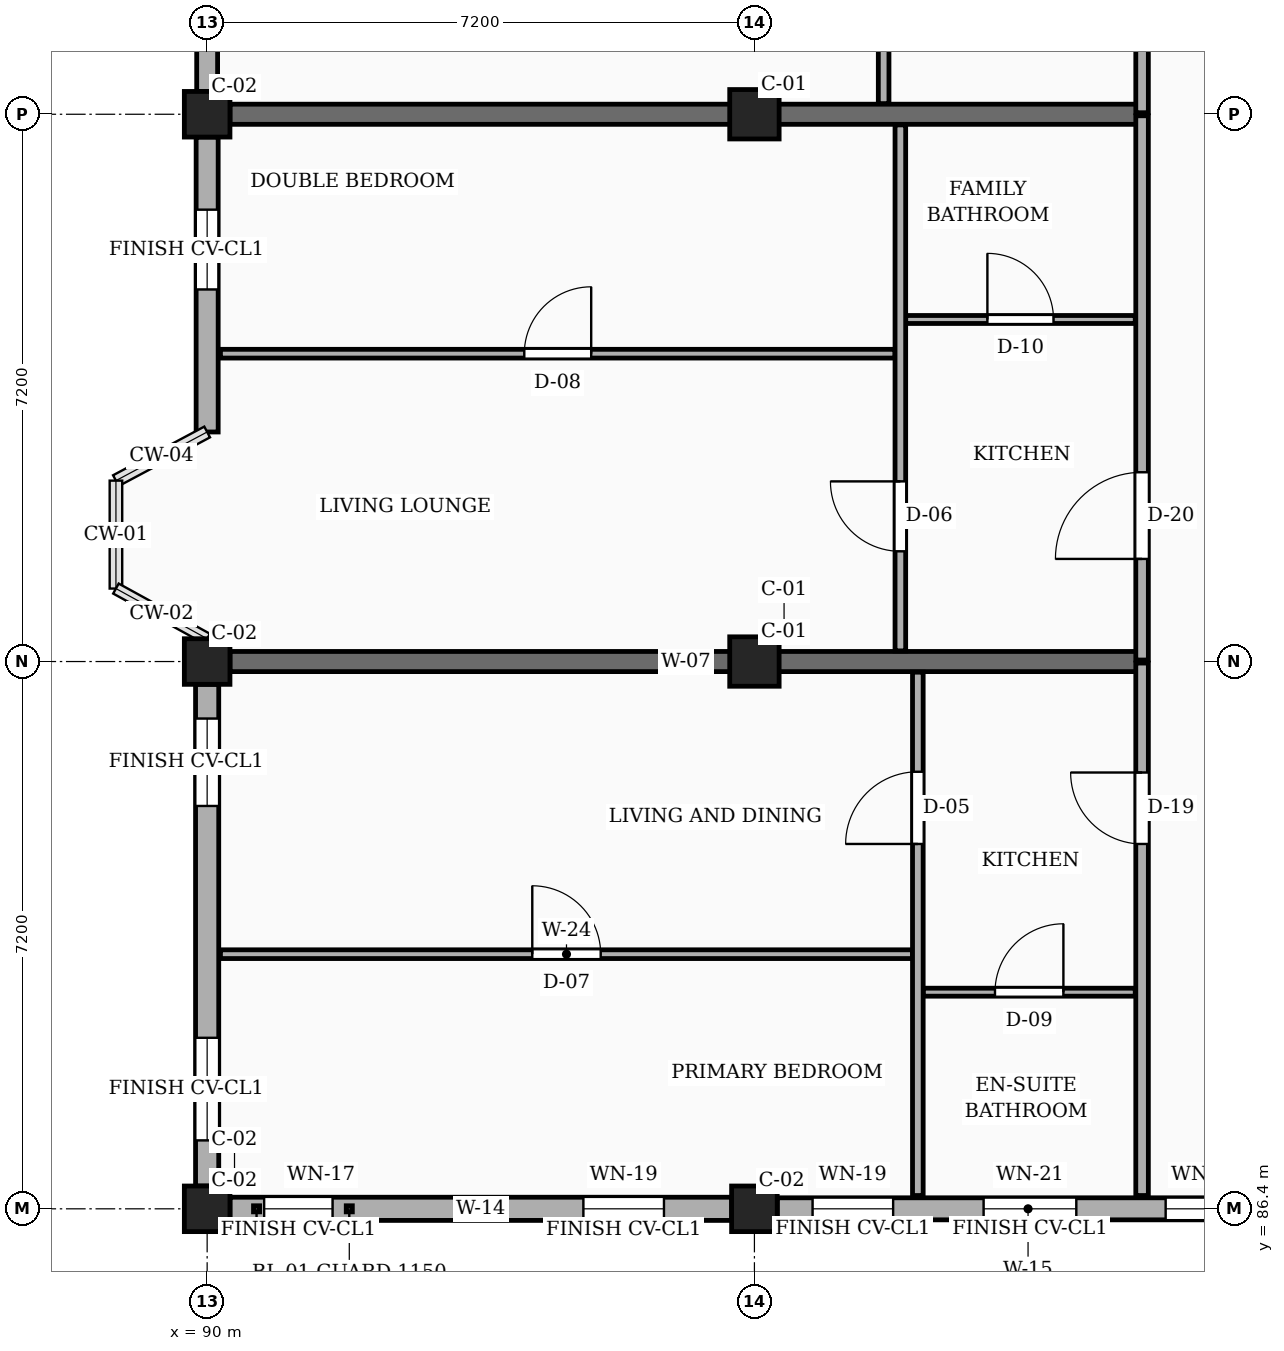
"""IFC4 building model, lengths in metres.
Left out: names, types, materials, properties, quantities, classifications, styles, units other than length and angle.
Written with IfcOpenShell. Run it as: python <this file> out.ifc"""

import sys

from ifc_helpers import new_model, si_unit, direction, frame, frame_2d, origin, origin_2d, place, context, subcontext, project, spatial, rectangle, extrude, element, fill, save


model = new_model("IFC4")
c1 = context("Model", 3, precision=1e-05, world=origin(), true_north=direction((0.0, 1.0)))
c2 = subcontext(c1, "Body", "Model", "MODEL_VIEW")
j1 = project(units=[si_unit("LENGTHUNIT", "METRE"), si_unit("PLANEANGLEUNIT", "RADIAN")], contexts=[c1])
p1 = place(None, origin())
s1 = spatial("IfcSite", under=j1, at=p1, CompositionType="ELEMENT")
p2 = place(p1, origin())
s2 = spatial("IfcBuilding", under=s1, at=p2, CompositionType="ELEMENT")
p3 = place(p2, frame((0.0, 0.0, 7.65)))
s3 = spatial("IfcBuildingStorey", under=s2, at=p3, CompositionType="ELEMENT", Elevation=7.65)
for number, where, z_axis, x_axis in (
    (1, (90.0, 86.4, 0.0), (0.0, 0.0, 1.0), (1.0, 0.0, 0.0)),
    (2, (90.0, 93.6, 0.0), (0.0, 0.0, 1.0), (1.0, 0.0, 0.0)),
    (3, (90.0, 100.8, 0.0), (0.0, 0.0, 1.0), (1.0, 0.0, 0.0)),
    (4, (97.2, 86.4, 0.0), (0.0, 0.0, 1.0), (1.0, 0.0, 0.0)),
):
    element("IfcColumn", number, at=place(p3, frame(where, z_axis=z_axis, x_axis=x_axis)), inside=s3, PredefinedType="COLUMN", context=c2, shape_type="SweptSolid", body=[
        extrude(rectangle(XDim=0.6, YDim=0.6, at=origin_2d()), origin(), (0.0, 0.0, 1.0), 3.15),
    ])
for number, where, z_axis, x_axis in (
    (5, (97.2, 93.6, 0.0), (0.0, 0.0, 1.0), (1.0, 0.0, 0.0)),
    (6, (97.2, 100.8, 0.0), (0.0, 0.0, 1.0), (1.0, 0.0, 0.0)),
):
    element("IfcColumn", number, at=place(p3, frame(where, z_axis=z_axis, x_axis=x_axis)), inside=s3, PredefinedType="COLUMN", context=c2, shape_type="SweptSolid", body=[
        extrude(rectangle(XDim=0.65, YDim=0.65, at=origin_2d()), origin(), (0.0, 0.0, 1.0), 3.15),
    ])
for number, where, z_axis, x_axis in (
    (7, (90.3, 93.6, 0.0), (0.0, 0.0, 1.0), (1.0, 0.0, 0.0)),
    (8, (90.3, 100.8, 0.0), (0.0, 0.0, 1.0), (1.0, 0.0, 0.0)),
):
    element("IfcWall", number, at=place(p3, frame(where, z_axis=z_axis, x_axis=x_axis)), inside=s3, PredefinedType="SOLIDWALL", context=c2, shape_type="SweptSolid", body=[
        extrude(rectangle(XDim=12.0, YDim=0.265, at=frame_2d((6.0, 0.0))), origin(), (0.0, 0.0, 1.0), 2.19),
    ])
p4 = place(p3, frame((90.3, 86.4, 0.0), z_axis=(0.0, 0.0, 1.0), x_axis=(1.0, 0.0, 0.0)))
e9 = element("IfcWall", 9, at=p4, inside=s3, PredefinedType="SOLIDWALL", context=c2, shape_type="SweptSolid", body=[
    extrude(rectangle(XDim=6.6, YDim=0.305, at=frame_2d((3.3, 0.0))), origin(), (0.0, 0.0, 1.0), 2.46),
])
p5 = place(p4, frame((0.45, 0.0, 0.78)))
e10 = element("IfcOpeningElement", 10, at=p5, cuts=e9, PredefinedType="OPENING", context=c2, shape_type="SweptSolid", body=[
    extrude(rectangle(XDim=0.9, YDim=1.36, at=frame_2d((0.45, 0.68))), frame((0.0, 0.163, 0.0), z_axis=(0.0, -1.0, 0.0), x_axis=(1.0, 0.0, 0.0)), (0.0, 0.0, 1.0), 0.325),
])
p6 = place(p4, frame((4.65, 0.0, 0.78)))
e11 = element("IfcOpeningElement", 11, at=p6, cuts=e9, PredefinedType="OPENING", context=c2, shape_type="SweptSolid", body=[
    extrude(rectangle(XDim=1.06, YDim=1.36, at=frame_2d((0.53, 0.68))), frame((0.0, 0.163, 0.0), z_axis=(0.0, -1.0, 0.0), x_axis=(1.0, 0.0, 0.0)), (0.0, 0.0, 1.0), 0.325),
])
p7 = place(p3, frame((97.5, 86.4, 0.0), z_axis=(0.0, 0.0, 1.0), x_axis=(1.0, 0.0, 0.0)))
e12 = element("IfcWall", 12, at=p7, inside=s3, PredefinedType="SOLIDWALL", context=c2, shape_type="SweptSolid", body=[
    extrude(rectangle(XDim=6.6, YDim=0.29, at=frame_2d((3.3, 0.0))), origin(), (0.0, 0.0, 1.0), 2.46),
])
p8 = place(p7, frame((0.465, 0.0, 0.78)))
e13 = element("IfcOpeningElement", 13, at=p8, cuts=e12, PredefinedType="OPENING", context=c2, shape_type="SweptSolid", body=[
    extrude(rectangle(XDim=1.06, YDim=1.36, at=frame_2d((0.53, 0.68))), frame((0.0, 0.155, 0.0), z_axis=(0.0, -1.0, 0.0), x_axis=(1.0, 0.0, 0.0)), (0.0, 0.0, 1.0), 0.31),
])
p9 = place(p7, frame((2.715, 0.0, 0.78)))
e14 = element("IfcOpeningElement", 14, at=p9, cuts=e12, PredefinedType="OPENING", context=c2, shape_type="SweptSolid", body=[
    extrude(rectangle(XDim=1.22, YDim=1.36, at=frame_2d((0.61, 0.68))), frame((0.0, 0.155, 0.0), z_axis=(0.0, -1.0, 0.0), x_axis=(1.0, 0.0, 0.0)), (0.0, 0.0, 1.0), 0.31),
])
p10 = place(p7, frame((5.11, 0.0, 0.78)))
e15 = element("IfcOpeningElement", 15, at=p10, cuts=e12, PredefinedType="OPENING", context=c2, shape_type="SweptSolid", body=[
    extrude(rectangle(XDim=1.04, YDim=1.26, at=frame_2d((0.52, 0.63))), frame((0.0, 0.155, 0.0), z_axis=(0.0, -1.0, 0.0), x_axis=(1.0, 0.0, 0.0)), (0.0, 0.0, 1.0), 0.31),
])
p11 = place(p3, frame((90.0, 107.7, 0.0), z_axis=(0.0, 0.0, 1.0), x_axis=(0.0, -1.0, 0.0)))
e16 = element("IfcWall", 16, at=p11, inside=s3, PredefinedType="SOLIDWALL", context=c2, shape_type="SweptSolid", body=[
    extrude(rectangle(XDim=6.6, YDim=0.275, at=frame_2d((3.3, 0.0))), origin(), (0.0, 0.0, 1.0), 2.46),
])
p12 = place(p11, frame((0.45, 0.0, 0.78)))
e17 = element("IfcOpeningElement", 17, at=p12, cuts=e16, PredefinedType="OPENING", context=c2, shape_type="SweptSolid", body=[
    extrude(rectangle(XDim=1.46, YDim=1.36, at=frame_2d((0.73, 0.68))), frame((0.0, 0.147, 0.0), z_axis=(0.0, -1.0, 0.0), x_axis=(1.0, 0.0, 0.0)), (0.0, 0.0, 1.0), 0.295),
])
p13 = place(p11, frame((4.65, 0.0, 0.78)))
e18 = element("IfcOpeningElement", 18, at=p13, cuts=e16, PredefinedType="OPENING", context=c2, shape_type="SweptSolid", body=[
    extrude(rectangle(XDim=1.05, YDim=1.44, at=frame_2d((0.525, 0.72))), frame((0.0, 0.147, 0.0), z_axis=(0.0, -1.0, 0.0), x_axis=(1.0, 0.0, 0.0)), (0.0, 0.0, 1.0), 0.295),
])
p14 = place(p3, frame((90.0, 100.5, 0.0), z_axis=(0.0, 0.0, 1.0), x_axis=(0.0, -1.0, 0.0)))
e19 = element("IfcWall", 19, at=p14, inside=s3, PredefinedType="SOLIDWALL", context=c2, shape_type="SweptSolid", body=[
    extrude(rectangle(XDim=3.88, YDim=0.29, at=frame_2d((1.94, 0.0))), origin(), (0.0, 0.0, 1.0), 2.46),
])
p15 = place(p14, frame((0.955, 0.0, 0.78)))
e20 = element("IfcOpeningElement", 20, at=p15, cuts=e19, PredefinedType="OPENING", context=c2, shape_type="SweptSolid", body=[
    extrude(rectangle(XDim=1.05, YDim=1.44, at=frame_2d((0.525, 0.72))), frame((0.0, 0.155, 0.0), z_axis=(0.0, -1.0, 0.0), x_axis=(1.0, 0.0, 0.0)), (0.0, 0.0, 1.0), 0.31),
])
p16 = place(p3, frame((90.0, 93.3, 0.0), z_axis=(0.0, 0.0, 1.0), x_axis=(0.0, -1.0, 0.0)))
e21 = element("IfcWall", 21, at=p16, inside=s3, PredefinedType="SOLIDWALL", context=c2, shape_type="SweptSolid", body=[
    extrude(rectangle(XDim=6.6, YDim=0.305, at=frame_2d((3.3, 0.0))), origin(), (0.0, 0.0, 1.0), 2.46),
])
p17 = place(p16, frame((0.45, 0.0, 0.78)))
e22 = element("IfcOpeningElement", 22, at=p17, cuts=e21, PredefinedType="OPENING", context=c2, shape_type="SweptSolid", body=[
    extrude(rectangle(XDim=1.15, YDim=1.44, at=frame_2d((0.575, 0.72))), frame((0.0, 0.163, 0.0), z_axis=(0.0, -1.0, 0.0), x_axis=(1.0, 0.0, 0.0)), (0.0, 0.0, 1.0), 0.325),
])
p18 = place(p16, frame((4.65, 0.0, 0.78)))
e23 = element("IfcOpeningElement", 23, at=p18, cuts=e21, PredefinedType="OPENING", context=c2, shape_type="SweptSolid", body=[
    extrude(rectangle(XDim=1.35, YDim=1.44, at=frame_2d((0.675, 0.72))), frame((0.0, 0.163, 0.0), z_axis=(0.0, -1.0, 0.0), x_axis=(1.0, 0.0, 0.0)), (0.0, 0.0, 1.0), 0.325),
])
p19 = place(p3, frame((102.3, 86.575, 0.0), z_axis=(0.0, 0.0, 1.0), x_axis=(0.0, 1.0, 0.0)))
e24 = element("IfcWall", 24, at=p19, inside=s3, PredefinedType="PARTITIONING", context=c2, shape_type="SweptSolid", body=[
    extrude(rectangle(XDim=7.005, YDim=0.165, at=frame_2d((3.502, 0.0))), origin(), (0.0, 0.0, 1.0), 2.325),
])
p20 = place(p19, frame((4.625, 0.0, 0.0)))
e25 = element("IfcOpeningElement", 25, at=p20, cuts=e24, PredefinedType="OPENING", context=c2, shape_type="SweptSolid", body=[
    extrude(rectangle(XDim=0.94, YDim=2.12, at=frame_2d((0.47, 1.06))), frame((0.0, 0.093, 0.0), z_axis=(0.0, -1.0, 0.0), x_axis=(1.0, 0.0, 0.0)), (0.0, 0.0, 1.0), 0.185),
])
p21 = place(p3, frame((102.3, 93.62, 0.0), z_axis=(0.0, 0.0, 1.0), x_axis=(0.0, 1.0, 0.0)))
e26 = element("IfcWall", 26, at=p21, inside=s3, PredefinedType="PARTITIONING", context=c2, shape_type="SweptSolid", body=[
    extrude(rectangle(XDim=7.16, YDim=0.165, at=frame_2d((3.58, 0.0))), origin(), (0.0, 0.0, 1.0), 2.325),
])
p22 = place(p21, frame((1.33, 0.0, 0.0)))
e27 = element("IfcOpeningElement", 27, at=p22, cuts=e26, PredefinedType="OPENING", context=c2, shape_type="SweptSolid", body=[
    extrude(rectangle(XDim=1.14, YDim=2.18, at=frame_2d((0.57, 1.09))), frame((0.0, 0.093, 0.0), z_axis=(0.0, -1.0, 0.0), x_axis=(1.0, 0.0, 0.0)), (0.0, 0.0, 1.0), 0.185),
])
p23 = place(p3, frame((102.3, 100.82, 0.0), z_axis=(0.0, 0.0, 1.0), x_axis=(0.0, 1.0, 0.0)))
e28 = element("IfcWall", 28, at=p23, inside=s3, PredefinedType="PARTITIONING", context=c2, shape_type="SweptSolid", body=[
    extrude(rectangle(XDim=7.16, YDim=0.165, at=frame_2d((3.58, 0.0))), origin(), (0.0, 0.0, 1.0), 2.325),
])
p24 = place(p23, frame((1.33, 0.0, 0.0)))
e29 = element("IfcOpeningElement", 29, at=p24, cuts=e28, PredefinedType="OPENING", context=c2, shape_type="SweptSolid", body=[
    extrude(rectangle(XDim=1.0, YDim=2.15, at=frame_2d((0.5, 1.075))), frame((0.0, 0.093, 0.0), z_axis=(0.0, -1.0, 0.0), x_axis=(1.0, 0.0, 0.0)), (0.0, 0.0, 1.0), 0.185),
])
p25 = place(p3, frame((90.175, 89.75, 0.0), z_axis=(0.0, 0.0, 1.0), x_axis=(1.0, 0.0, 0.0)))
e30 = element("IfcWall", 30, at=p25, inside=s3, PredefinedType="PARTITIONING", context=c2, shape_type="SweptSolid", body=[
    extrude(rectangle(XDim=9.105, YDim=0.115, at=frame_2d((4.552, 0.0))), origin(), (0.0, 0.0, 1.0), 2.325),
])
p26 = place(p25, frame((4.103, 0.0, 0.0)))
e31 = element("IfcOpeningElement", 31, at=p26, cuts=e30, PredefinedType="OPENING", context=c2, shape_type="SweptSolid", body=[
    extrude(rectangle(XDim=0.9, YDim=2.1, at=frame_2d((0.45, 1.05))), frame((0.0, 0.067, 0.0), z_axis=(0.0, -1.0, 0.0), x_axis=(1.0, 0.0, 0.0)), (0.0, 0.0, 1.0), 0.135),
])
p27 = place(p3, frame((99.42, 89.25, 0.0), z_axis=(0.0, 0.0, 1.0), x_axis=(1.0, 0.0, 0.0)))
e32 = element("IfcWall", 32, at=p27, inside=s3, PredefinedType="PARTITIONING", context=c2, shape_type="SweptSolid", body=[
    extrude(rectangle(XDim=2.79, YDim=0.105, at=frame_2d((1.395, 0.0))), origin(), (0.0, 0.0, 1.0), 2.325),
])
p28 = place(p27, frame((0.945, 0.0, 0.0)))
e33 = element("IfcOpeningElement", 33, at=p28, cuts=e32, PredefinedType="OPENING", context=c2, shape_type="SweptSolid", body=[
    extrude(rectangle(XDim=0.9, YDim=2.05, at=frame_2d((0.45, 1.025))), frame((0.0, 0.062, 0.0), z_axis=(0.0, -1.0, 0.0), x_axis=(1.0, 0.0, 0.0)), (0.0, 0.0, 1.0), 0.125),
])
p29 = place(p3, frame((99.35, 86.575, 0.0), z_axis=(0.0, 0.0, 1.0), x_axis=(0.0, 1.0, 0.0)))
e34 = element("IfcWall", 34, at=p29, inside=s3, PredefinedType="PARTITIONING", context=c2, shape_type="SweptSolid", body=[
    extrude(rectangle(XDim=6.885, YDim=0.14, at=frame_2d((3.442, 0.0))), origin(), (0.0, 0.0, 1.0), 2.325),
])
p30 = place(p29, frame((4.625, 0.0, 0.0)))
e35 = element("IfcOpeningElement", 35, at=p30, cuts=e34, PredefinedType="OPENING", context=c2, shape_type="SweptSolid", body=[
    extrude(rectangle(XDim=0.95, YDim=2.1, at=frame_2d((0.475, 1.05))), frame((0.0, 0.08, 0.0), z_axis=(0.0, -1.0, 0.0), x_axis=(1.0, 0.0, 0.0)), (0.0, 0.0, 1.0), 0.16),
])
p31 = place(p3, frame((90.175, 97.65, 0.0), z_axis=(0.0, 0.0, 1.0), x_axis=(1.0, 0.0, 0.0)))
e36 = element("IfcWall", 36, at=p31, inside=s3, PredefinedType="PARTITIONING", context=c2, shape_type="SweptSolid", body=[
    extrude(rectangle(XDim=8.875, YDim=0.115, at=frame_2d((4.438, 0.0))), origin(), (0.0, 0.0, 1.0), 2.325),
])
p32 = place(p31, frame((3.998, 0.0, 0.0)))
e37 = element("IfcOpeningElement", 37, at=p32, cuts=e36, PredefinedType="OPENING", context=c2, shape_type="SweptSolid", body=[
    extrude(rectangle(XDim=0.88, YDim=2.08, at=frame_2d((0.44, 1.04))), frame((0.0, 0.067, 0.0), z_axis=(0.0, -1.0, 0.0), x_axis=(1.0, 0.0, 0.0)), (0.0, 0.0, 1.0), 0.135),
])
p33 = place(p3, frame((99.19, 98.1, 0.0), z_axis=(0.0, 0.0, 1.0), x_axis=(1.0, 0.0, 0.0)))
e38 = element("IfcWall", 38, at=p33, inside=s3, PredefinedType="PARTITIONING", context=c2, shape_type="SweptSolid", body=[
    extrude(rectangle(XDim=3.02, YDim=0.105, at=frame_2d((1.51, 0.0))), origin(), (0.0, 0.0, 1.0), 2.325),
])
p34 = place(p33, frame((1.075, 0.0, 0.0)))
e39 = element("IfcOpeningElement", 39, at=p34, cuts=e38, PredefinedType="OPENING", context=c2, shape_type="SweptSolid", body=[
    extrude(rectangle(XDim=0.87, YDim=2.05, at=frame_2d((0.435, 1.025))), frame((0.0, 0.062, 0.0), z_axis=(0.0, -1.0, 0.0), x_axis=(1.0, 0.0, 0.0)), (0.0, 0.0, 1.0), 0.125),
])
p35 = place(p3, frame((99.12, 93.74, 0.0), z_axis=(0.0, 0.0, 1.0), x_axis=(0.0, 1.0, 0.0)))
e40 = element("IfcWall", 40, at=p35, inside=s3, PredefinedType="PARTITIONING", context=c2, shape_type="SweptSolid", body=[
    extrude(rectangle(XDim=6.92, YDim=0.14, at=frame_2d((3.46, 0.0))), origin(), (0.0, 0.0, 1.0), 2.325),
])
p36 = place(p35, frame((1.31, 0.0, 0.0)))
e41 = element("IfcOpeningElement", 41, at=p36, cuts=e40, PredefinedType="OPENING", context=c2, shape_type="SweptSolid", body=[
    extrude(rectangle(XDim=0.92, YDim=2.1, at=frame_2d((0.46, 1.05))), frame((0.0, 0.08, 0.0), z_axis=(0.0, -1.0, 0.0), x_axis=(1.0, 0.0, 0.0)), (0.0, 0.0, 1.0), 0.16),
])
p37 = place(p3, frame((98.9, 100.94, 0.0), z_axis=(0.0, 0.0, 1.0), x_axis=(0.0, 1.0, 0.0)))
e42 = element("IfcWall", 42, at=p37, inside=s3, PredefinedType="PARTITIONING", context=c2, shape_type="SweptSolid", body=[
    extrude(rectangle(XDim=6.92, YDim=0.14, at=frame_2d((3.46, 0.0))), origin(), (0.0, 0.0, 1.0), 2.325),
])
p38 = place(p37, frame((1.31, 0.0, 0.0)))
e43 = element("IfcOpeningElement", 43, at=p38, cuts=e42, PredefinedType="OPENING", context=c2, shape_type="SweptSolid", body=[
    extrude(rectangle(XDim=0.95, YDim=2.1, at=frame_2d((0.475, 1.05))), frame((0.0, 0.08, 0.0), z_axis=(0.0, -1.0, 0.0), x_axis=(1.0, 0.0, 0.0)), (0.0, 0.0, 1.0), 0.16),
])
p39 = place(p5, origin())
e44 = element("IfcWindow", 44, at=p39, inside=s3, PartitioningType="SINGLE_PANEL", PredefinedType="WINDOW", context=c2, shape_type="SweptSolid", body=[
    extrude(rectangle(XDim=0.9, YDim=1.36, at=frame_2d((0.45, 0.68))), frame((0.0, 0.03, 0.0), z_axis=(0.0, -1.0, 0.0), x_axis=(1.0, 0.0, 0.0)), (0.0, 0.0, 1.0), 0.06),
])
fill(e10, e44)
p40 = place(p6, origin())
e45 = element("IfcWindow", 45, at=p40, inside=s3, PartitioningType="SINGLE_PANEL", PredefinedType="WINDOW", context=c2, shape_type="SweptSolid", body=[
    extrude(rectangle(XDim=1.06, YDim=1.36, at=frame_2d((0.53, 0.68))), frame((0.0, 0.03, 0.0), z_axis=(0.0, -1.0, 0.0), x_axis=(1.0, 0.0, 0.0)), (0.0, 0.0, 1.0), 0.06),
])
fill(e11, e45)
p41 = place(p8, origin())
e46 = element("IfcWindow", 46, at=p41, inside=s3, PartitioningType="SINGLE_PANEL", PredefinedType="WINDOW", context=c2, shape_type="SweptSolid", body=[
    extrude(rectangle(XDim=1.06, YDim=1.36, at=frame_2d((0.53, 0.68))), frame((0.0, 0.03, 0.0), z_axis=(0.0, -1.0, 0.0), x_axis=(1.0, 0.0, 0.0)), (0.0, 0.0, 1.0), 0.06),
])
fill(e13, e46)
p42 = place(p9, origin())
e47 = element("IfcWindow", 47, at=p42, inside=s3, PartitioningType="SINGLE_PANEL", PredefinedType="WINDOW", context=c2, shape_type="SweptSolid", body=[
    extrude(rectangle(XDim=1.22, YDim=1.36, at=frame_2d((0.61, 0.68))), frame((0.0, 0.03, 0.0), z_axis=(0.0, -1.0, 0.0), x_axis=(1.0, 0.0, 0.0)), (0.0, 0.0, 1.0), 0.06),
])
fill(e14, e47)
p43 = place(p10, origin())
e48 = element("IfcWindow", 48, at=p43, inside=s3, PartitioningType="SINGLE_PANEL", PredefinedType="WINDOW", context=c2, shape_type="SweptSolid", body=[
    extrude(rectangle(XDim=1.04, YDim=1.26, at=frame_2d((0.52, 0.63))), frame((0.0, 0.03, 0.0), z_axis=(0.0, -1.0, 0.0), x_axis=(1.0, 0.0, 0.0)), (0.0, 0.0, 1.0), 0.06),
])
fill(e15, e48)
p44 = place(p15, origin())
e49 = element("IfcWindow", 49, at=p44, inside=s3, PartitioningType="SINGLE_PANEL", PredefinedType="WINDOW", context=c2, shape_type="SweptSolid", body=[
    extrude(rectangle(XDim=1.05, YDim=1.44, at=frame_2d((0.525, 0.72))), frame((0.0, 0.03, 0.0), z_axis=(0.0, -1.0, 0.0), x_axis=(1.0, 0.0, 0.0)), (0.0, 0.0, 1.0), 0.06),
])
fill(e20, e49)
p45 = place(p17, origin())
e50 = element("IfcWindow", 50, at=p45, inside=s3, PartitioningType="SINGLE_PANEL", PredefinedType="WINDOW", context=c2, shape_type="SweptSolid", body=[
    extrude(rectangle(XDim=1.15, YDim=1.44, at=frame_2d((0.575, 0.72))), frame((0.0, 0.03, 0.0), z_axis=(0.0, -1.0, 0.0), x_axis=(1.0, 0.0, 0.0)), (0.0, 0.0, 1.0), 0.06),
])
fill(e22, e50)
p46 = place(p18, origin())
e51 = element("IfcWindow", 51, at=p46, inside=s3, PartitioningType="SINGLE_PANEL", PredefinedType="WINDOW", context=c2, shape_type="SweptSolid", body=[
    extrude(rectangle(XDim=1.35, YDim=1.44, at=frame_2d((0.675, 0.72))), frame((0.0, 0.03, 0.0), z_axis=(0.0, -1.0, 0.0), x_axis=(1.0, 0.0, 0.0)), (0.0, 0.0, 1.0), 0.06),
])
fill(e23, e51)
p47 = place(p20, origin())
e52 = element("IfcDoor", 52, at=p47, inside=s3, OperationType="SINGLE_SWING_RIGHT", PredefinedType="DOOR", context=c2, shape_type="SweptSolid", body=[
    extrude(rectangle(XDim=0.94, YDim=2.12, at=frame_2d((0.47, 1.06))), frame((0.0, 0.025, 0.0), z_axis=(0.0, -1.0, 0.0), x_axis=(1.0, 0.0, 0.0)), (0.0, 0.0, 1.0), 0.05),
])
fill(e25, e52)
p48 = place(p22, origin())
e53 = element("IfcDoor", 53, at=p48, inside=s3, OperationType="SINGLE_SWING_LEFT", PredefinedType="DOOR", context=c2, shape_type="SweptSolid", body=[
    extrude(rectangle(XDim=1.14, YDim=2.18, at=frame_2d((0.57, 1.09))), frame((0.0, 0.025, 0.0), z_axis=(0.0, -1.0, 0.0), x_axis=(1.0, 0.0, 0.0)), (0.0, 0.0, 1.0), 0.05),
])
fill(e27, e53)
p49 = place(p26, origin())
e54 = element("IfcDoor", 54, at=p49, inside=s3, OperationType="SINGLE_SWING_LEFT", PredefinedType="DOOR", context=c2, shape_type="SweptSolid", body=[
    extrude(rectangle(XDim=0.9, YDim=2.1, at=frame_2d((0.45, 1.05))), frame((0.0, 0.025, 0.0), z_axis=(0.0, -1.0, 0.0), x_axis=(1.0, 0.0, 0.0)), (0.0, 0.0, 1.0), 0.05),
])
fill(e31, e54)
p50 = place(p28, origin())
e55 = element("IfcDoor", 55, at=p50, inside=s3, OperationType="SINGLE_SWING_RIGHT", PredefinedType="DOOR", context=c2, shape_type="SweptSolid", body=[
    extrude(rectangle(XDim=0.9, YDim=2.05, at=frame_2d((0.45, 1.025))), frame((0.0, 0.025, 0.0), z_axis=(0.0, -1.0, 0.0), x_axis=(1.0, 0.0, 0.0)), (0.0, 0.0, 1.0), 0.05),
])
fill(e33, e55)
p51 = place(p30, origin())
e56 = element("IfcDoor", 56, at=p51, inside=s3, OperationType="SINGLE_SWING_LEFT", PredefinedType="DOOR", context=c2, shape_type="SweptSolid", body=[
    extrude(rectangle(XDim=0.95, YDim=2.1, at=frame_2d((0.475, 1.05))), frame((0.0, 0.025, 0.0), z_axis=(0.0, -1.0, 0.0), x_axis=(1.0, 0.0, 0.0)), (0.0, 0.0, 1.0), 0.05),
])
fill(e35, e56)
p52 = place(p32, origin())
e57 = element("IfcDoor", 57, at=p52, inside=s3, OperationType="SINGLE_SWING_RIGHT", PredefinedType="DOOR", context=c2, shape_type="SweptSolid", body=[
    extrude(rectangle(XDim=0.88, YDim=2.08, at=frame_2d((0.44, 1.04))), frame((0.0, 0.025, 0.0), z_axis=(0.0, -1.0, 0.0), x_axis=(1.0, 0.0, 0.0)), (0.0, 0.0, 1.0), 0.05),
])
fill(e37, e57)
p53 = place(p34, origin())
e58 = element("IfcDoor", 58, at=p53, inside=s3, OperationType="SINGLE_SWING_LEFT", PredefinedType="DOOR", context=c2, shape_type="SweptSolid", body=[
    extrude(rectangle(XDim=0.87, YDim=2.05, at=frame_2d((0.435, 1.025))), frame((0.0, 0.025, 0.0), z_axis=(0.0, -1.0, 0.0), x_axis=(1.0, 0.0, 0.0)), (0.0, 0.0, 1.0), 0.05),
])
fill(e39, e58)
p54 = place(p36, origin())
e59 = element("IfcDoor", 59, at=p54, inside=s3, OperationType="SINGLE_SWING_RIGHT", PredefinedType="DOOR", context=c2, shape_type="SweptSolid", body=[
    extrude(rectangle(XDim=0.92, YDim=2.1, at=frame_2d((0.46, 1.05))), frame((0.0, 0.025, 0.0), z_axis=(0.0, -1.0, 0.0), x_axis=(1.0, 0.0, 0.0)), (0.0, 0.0, 1.0), 0.05),
])
fill(e41, e59)
save(model, sys.argv[1])
